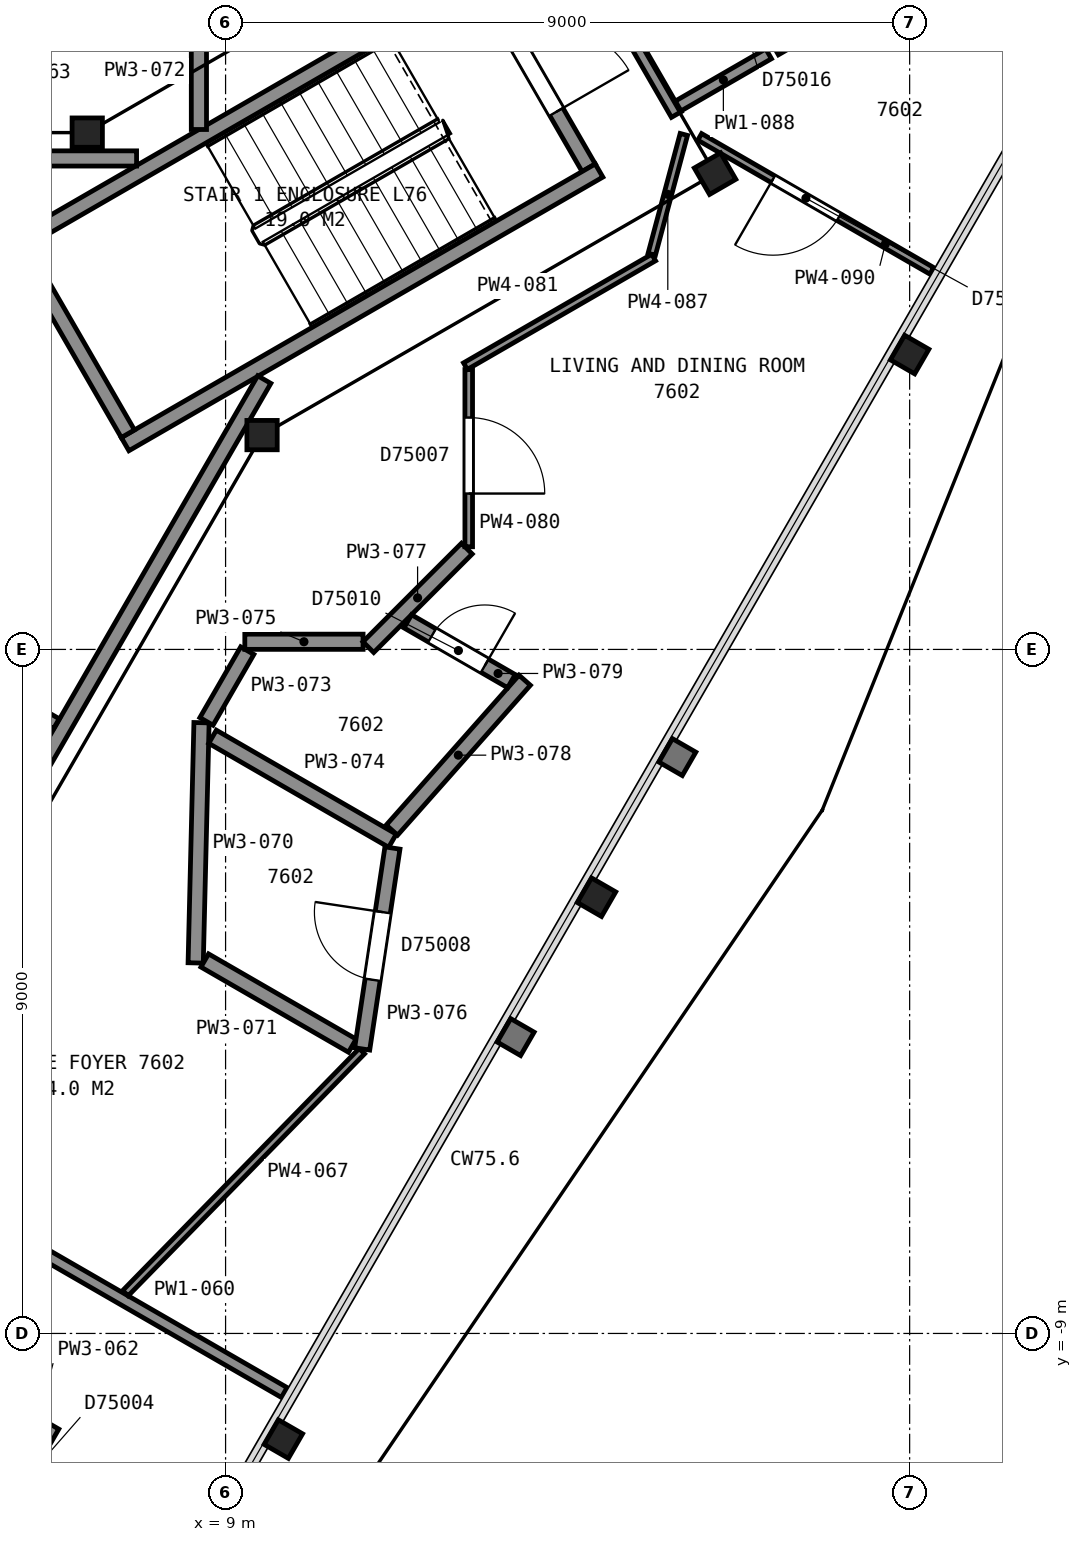
"""IFC4 building model, lengths in metres.
Left out: names, types, materials, properties, quantities, classifications, styles, units other than length and angle.
Written with IfcOpenShell. Run it as: python <this file> out.ifc"""

import sys

from ifc_helpers import new_model, si_unit, direction, frame, frame_2d, origin, origin_2d, place, context, subcontext, project, spatial, rectangle, i_section, extrude, element, fill, save


model = new_model("IFC4")
c1 = context("Model", 3, precision=1e-05, world=origin(), true_north=direction((0.0, 1.0)))
c2 = subcontext(c1, "Body", "Model", "MODEL_VIEW")
j1 = project(units=[si_unit("LENGTHUNIT", "METRE"), si_unit("PLANEANGLEUNIT", "RADIAN")], contexts=[c1])
p1 = place(None, origin())
s1 = spatial("IfcSite", under=j1, at=p1, CompositionType="ELEMENT")
p2 = place(p1, origin())
s2 = spatial("IfcBuilding", under=s1, at=p2, CompositionType="ELEMENT")
p3 = place(p2, frame((0.0, 0.0, 301.0)))
s3 = spatial("IfcBuildingStorey", under=s2, at=p3, CompositionType="ELEMENT", Elevation=301.0)
for number, where, z_axis, x_axis in (
    (1, (9.76, -10.39, 0.0), (0.0, 0.0, 1.0), (-0.5, -0.866, 0.0)),
    (2, (13.88, -3.26, 0.0), (0.0, 0.0, 1.0), (-0.5, -0.866, 0.0)),
):
    element("IfcColumn", number, at=place(p3, frame(where, z_axis=z_axis, x_axis=x_axis)), inside=s3, PredefinedType="COLUMN", context=c2, shape_type="SweptSolid", body=[
        extrude(i_section(OverallWidth=0.373, OverallDepth=0.368, WebThickness=0.015, FlangeThickness=0.024, FilletRadius=0.015, at=origin_2d()), origin(), (0.0, 0.0, 1.0), 3.655),
    ])
p4 = place(p3, frame((18.0, 3.88, 0.0), z_axis=(0.0, 0.0, 1.0), x_axis=(-0.5, -0.866025403784, 0.0)))
e3 = element("IfcColumn", 3, at=p4, inside=s3, PredefinedType="COLUMN", context=c2, shape_type="SweptSolid", body=[
    extrude(i_section(OverallWidth=0.373, OverallDepth=0.368, WebThickness=0.015, FlangeThickness=0.024, FilletRadius=0.015, at=origin_2d()), origin(), (0.0, 0.0, 1.0), 3.645),
])
p5 = place(p3, frame((9.48, 2.82, 0.0), z_axis=(0.0, 0.0, 1.0), x_axis=(1.0, 0.0, 0.0)))
e4 = element("IfcColumn", 4, at=p5, inside=s3, PredefinedType="COLUMN", context=c2, shape_type="SweptSolid", body=[
    extrude(i_section(OverallWidth=0.399, OverallDepth=0.386, WebThickness=0.021, FlangeThickness=0.033, FilletRadius=0.015, at=origin_2d()), origin(), (0.0, 0.0, 1.0), 3.7),
])
p6 = place(p3, frame((15.44, 6.26, 0.0), z_axis=(0.0, 0.0, 1.0), x_axis=(0.5, -0.866025403784, 0.0)))
e5 = element("IfcColumn", 5, at=p6, inside=s3, PredefinedType="COLUMN", context=c2, shape_type="SweptSolid", body=[
    extrude(i_section(OverallWidth=0.401, OverallDepth=0.399, WebThickness=0.025, FlangeThickness=0.04, FilletRadius=0.015, at=origin_2d()), origin(), (0.0, 0.0, 1.0), 3.7),
])
p7 = place(p3, frame((7.18, 6.8, 0.0), z_axis=(0.0, 0.0, 1.0), x_axis=(1.0, 0.0, 0.0)))
e6 = element("IfcColumn", 6, at=p7, inside=s3, PredefinedType="COLUMN", context=c2, shape_type="SweptSolid", body=[
    extrude(i_section(OverallWidth=0.399, OverallDepth=0.386, WebThickness=0.021, FlangeThickness=0.033, FilletRadius=0.015, at=origin_2d()), origin(), (0.0, 0.0, 1.0), 3.7),
])
p8 = place(p3, frame((13.777, 6.338, 0.0), z_axis=(0.0, 0.0, 1.0), x_axis=(-0.500049511043, 0.865996816683, 0.0)))
e7 = element("IfcWall", 7, at=p8, inside=s3, PredefinedType="PARTITIONING", context=c2, shape_type="SweptSolid", body=[
    extrude(rectangle(XDim=2.8, YDim=0.2, at=frame_2d((1.4, 0.0))), origin(), (0.0, 0.0, 1.0), 3.45),
])
p9 = place(p8, frame((0.85, 0.0, 0.0)))
e8 = element("IfcOpeningElement", 8, at=p9, cuts=e7, PredefinedType="OPENING", context=c2, shape_type="SweptSolid", body=[
    extrude(rectangle(XDim=1.1, YDim=2.1, at=frame_2d((0.55, 1.05))), frame((0.0, 0.11, 0.0), z_axis=(0.0, -1.0, 0.0), x_axis=(1.0, 0.0, 0.0)), (0.0, 0.0, 1.0), 0.22),
])
for number, where, z_axis, x_axis in (
    (9, (6.178, 5.299, 0.0), (0.0, 0.0, 1.0), (0.866, 0.5, 0.0)),
    (10, (7.678, 2.701, 0.0), (0.0, 0.0, 1.0), (0.866, 0.5, 0.0)),
):
    element("IfcWall", number, at=place(p3, frame(where, z_axis=z_axis, x_axis=x_axis)), inside=s3, PredefinedType="PARTITIONING", context=c2, shape_type="SweptSolid", body=[
        extrude(rectangle(XDim=7.2, YDim=0.2, at=frame_2d((3.6, 0.0))), origin(), (0.0, 0.0, 1.0), 3.45),
    ])
p10 = place(p3, frame((7.715, 2.838, 0.0), z_axis=(0.0, 0.0, 1.0), x_axis=(-0.500049511043, 0.865996816683, 0.0)))
e11 = element("IfcWall", 11, at=p10, inside=s3, PredefinedType="PARTITIONING", context=c2, shape_type="SweptSolid", body=[
    extrude(rectangle(XDim=2.8, YDim=0.2, at=frame_2d((1.4, 0.0))), origin(), (0.0, 0.0, 1.0), 3.45),
])
p11 = place(p3, frame((7.829, 6.46, 0.0), z_axis=(0.0, 0.0, 1.0), x_axis=(-1.0, 0.0, 0.0)))
e12 = element("IfcWall", 12, at=p11, inside=s3, PredefinedType="PARTITIONING", context=c2, shape_type="SweptSolid", body=[
    extrude(rectangle(XDim=15.658, YDim=0.2, at=frame_2d((7.829, 0.0))), origin(), (0.0, 0.0, 1.0), 3.45),
])
p12 = place(p11, frame((12.168, 0.0, 0.0)))
e13 = element("IfcOpeningElement", 13, at=p12, cuts=e12, PredefinedType="OPENING", context=c2, shape_type="SweptSolid", body=[
    extrude(rectangle(XDim=1.2, YDim=2.1, at=frame_2d((0.6, 1.05))), frame((0.0, 0.11, 0.0), z_axis=(0.0, -1.0, 0.0), x_axis=(1.0, 0.0, 0.0)), (0.0, 0.0, 1.0), 0.22),
])
p13 = place(p3, frame((3.828, -6.29, 0.0), z_axis=(0.0, 0.0, 1.0), x_axis=(0.499979739078, 0.866037101117, 0.0)))
e14 = element("IfcWall", 14, at=p13, inside=s3, PredefinedType="PARTITIONING", context=c2, shape_type="SweptSolid", body=[
    extrude(rectangle(XDim=11.363, YDim=0.2, at=frame_2d((5.681, 0.0))), origin(), (0.0, 0.0, 1.0), 3.45),
])
p14 = place(p13, frame((0.55, 0.0, 0.0)))
e15 = element("IfcOpeningElement", 15, at=p14, cuts=e14, PredefinedType="OPENING", context=c2, shape_type="SweptSolid", body=[
    extrude(rectangle(XDim=1.2, YDim=2.1, at=frame_2d((0.6, 1.05))), frame((0.0, 0.11, 0.0), z_axis=(0.0, -1.0, 0.0), x_axis=(1.0, 0.0, 0.0)), (0.0, 0.0, 1.0), 0.22),
])
p15 = place(p3, frame((6.774, -0.978, 0.0), z_axis=(0.0, 0.0, 1.0), x_axis=(-0.866062920605, 0.499935013329, 0.0)))
e16 = element("IfcWall", 16, at=p15, inside=s3, PredefinedType="PARTITIONING", context=c2, shape_type="SweptSolid", body=[
    extrude(rectangle(XDim=2.22, YDim=0.15, at=frame_2d((1.11, 0.0))), origin(), (0.0, 0.0, 1.0), 3.45),
])
p16 = place(p15, frame((0.646, 0.0, 0.0)))
e17 = element("IfcOpeningElement", 17, at=p16, cuts=e16, PredefinedType="OPENING", context=c2, shape_type="SweptSolid", body=[
    extrude(rectangle(XDim=0.9, YDim=2.1, at=frame_2d((0.45, 1.05))), frame((0.0, 0.085, 0.0), z_axis=(0.0, -1.0, 0.0), x_axis=(1.0, 0.0, 0.0)), (0.0, 0.0, 1.0), 0.17),
])
p17 = place(p3, frame((3.682, -8.571, 0.0), z_axis=(0.0, 0.0, 1.0), x_axis=(0.866075604562, -0.499913039621, 0.0)))
e18 = element("IfcWall", 18, at=p17, inside=s3, PredefinedType="PARTITIONING", context=c2, shape_type="SweptSolid", body=[
    extrude(rectangle(XDim=3.549, YDim=0.2, at=frame_2d((1.774, 0.0))), origin(), (0.0, 0.0, 1.0), 2.723),
])
p18 = place(p3, frame((9.772, -9.777, 0.0), z_axis=(0.0, 0.0, 1.0), x_axis=(-0.866083818164, 0.499898809675, 0.0)))
e19 = element("IfcWall", 19, at=p18, inside=s3, PredefinedType="PARTITIONING", context=c2, shape_type="SweptSolid", body=[
    extrude(rectangle(XDim=6.551, YDim=0.15, at=frame_2d((3.275, 0.0))), origin(), (0.0, 0.0, 1.0), 2.723),
])
p19 = place(p18, frame((4.001, 0.0, 0.0)))
e20 = element("IfcOpeningElement", 20, at=p19, cuts=e19, PredefinedType="OPENING", context=c2, shape_type="SweptSolid", body=[
    extrude(rectangle(XDim=1.0, YDim=2.1, at=frame_2d((0.5, 1.05))), frame((0.0, 0.085, 0.0), z_axis=(0.0, -1.0, 0.0), x_axis=(1.0, 0.0, 0.0)), (0.0, 0.0, 1.0), 0.17),
])
p20 = place(p3, frame((7.682, -8.47, 0.0), z_axis=(0.0, 0.0, 1.0), x_axis=(0.698777378461, 0.715339203002, 0.0)))
e21 = element("IfcWall", 21, at=p20, inside=s3, PredefinedType="PARTITIONING", context=c2, shape_type="SweptSolid", body=[
    extrude(rectangle(XDim=4.452, YDim=0.1, at=frame_2d((2.226, 0.0))), origin(), (0.0, 0.0, 1.0), 2.723),
])
p21 = place(p3, frame((8.607, -4.125, 0.0), z_axis=(0.0, 0.0, 1.0), x_axis=(0.024245593124, 0.999706032399, 0.0)))
e22 = element("IfcWall", 22, at=p21, inside=s3, PredefinedType="PARTITIONING", context=c2, shape_type="SweptSolid", body=[
    extrude(rectangle(XDim=3.162, YDim=0.2, at=frame_2d((1.581, 0.0))), origin(), (0.0, 0.0, 1.0), 2.723),
])
p22 = place(p3, frame((8.726, -4.093, 0.0), z_axis=(0.0, 0.0, 1.0), x_axis=(0.866056839033, -0.499945548598, 0.0)))
e23 = element("IfcWall", 23, at=p22, inside=s3, PredefinedType="PARTITIONING", context=c2, shape_type="SweptSolid", body=[
    extrude(rectangle(XDim=2.242, YDim=0.2, at=frame_2d((1.121, 0.0))), origin(), (0.0, 0.0, 1.0), 2.723),
])
p23 = place(p3, frame((8.649, 6.841, 0.0), z_axis=(0.0, 0.0, 1.0), x_axis=(0.0, 1.0, 0.0)))
e24 = element("IfcWall", 24, at=p23, inside=s3, PredefinedType="PARTITIONING", context=c2, shape_type="SweptSolid", body=[
    extrude(rectangle(XDim=1.528, YDim=0.2, at=frame_2d((0.764, 0.0))), origin(), (0.0, 0.0, 1.0), 2.723),
])
p24 = place(p3, frame((8.749, -0.947, 0.0), z_axis=(0.0, 0.0, 1.0), x_axis=(0.499656913366, 0.866223394354, 0.0)))
e25 = element("IfcWall", 25, at=p24, inside=s3, PredefinedType="PARTITIONING", context=c2, shape_type="SweptSolid", body=[
    extrude(rectangle(XDim=1.075, YDim=0.2, at=frame_2d((0.538, 0.0))), origin(), (0.0, 0.0, 1.0), 2.723),
])
p25 = place(p3, frame((8.828, -1.149, 0.0), z_axis=(0.0, 0.0, 1.0), x_axis=(0.865853899269, -0.50029693695, 0.0)))
e26 = element("IfcWall", 26, at=p25, inside=s3, PredefinedType="PARTITIONING", context=c2, shape_type="SweptSolid", body=[
    extrude(rectangle(XDim=2.734, YDim=0.2, at=frame_2d((1.367, 0.0))), origin(), (0.0, 0.0, 1.0), 2.723),
])
p26 = place(p3, frame((9.253, 0.101, 0.0), z_axis=(0.0, 0.0, 1.0), x_axis=(1.0, 0.0, 0.0)))
e27 = element("IfcWall", 27, at=p26, inside=s3, PredefinedType="PARTITIONING", context=c2, shape_type="SweptSolid", body=[
    extrude(rectangle(XDim=1.556, YDim=0.2, at=frame_2d((0.778, 0.0))), origin(), (0.0, 0.0, 1.0), 2.723),
])
p27 = place(p3, frame((10.797, -5.256, 0.0), z_axis=(0.0, 0.0, 1.0), x_axis=(0.148961207986, 0.988843040384, 0.0)))
e28 = element("IfcWall", 28, at=p27, inside=s3, PredefinedType="PARTITIONING", context=c2, shape_type="SweptSolid", body=[
    extrude(rectangle(XDim=2.673, YDim=0.2, at=frame_2d((1.336, 0.0))), origin(), (0.0, 0.0, 1.0), 2.723),
])
p28 = place(p27, frame((0.92, 0.0, 0.0)))
e29 = element("IfcOpeningElement", 29, at=p28, cuts=e28, PredefinedType="OPENING", context=c2, shape_type="SweptSolid", body=[
    extrude(rectangle(XDim=0.9, YDim=2.1, at=frame_2d((0.45, 1.05))), frame((0.0, 0.11, 0.0), z_axis=(0.0, -1.0, 0.0), x_axis=(1.0, 0.0, 0.0)), (0.0, 0.0, 1.0), 0.22),
])
p29 = place(p3, frame((10.878, 0.03, 0.0), z_axis=(0.0, 0.0, 1.0), x_axis=(0.707173379423, 0.707040176677, 0.0)))
e30 = element("IfcWall", 30, at=p29, inside=s3, PredefinedType="PARTITIONING", context=c2, shape_type="SweptSolid", body=[
    extrude(rectangle(XDim=1.833, YDim=0.2, at=frame_2d((0.917, 0.0))), origin(), (0.0, 0.0, 1.0), 2.723),
])
p30 = place(p3, frame((11.188, -2.377, 0.0), z_axis=(0.0, 0.0, 1.0), x_axis=(0.663045631266, 0.748578981043, 0.0)))
e31 = element("IfcWall", 31, at=p30, inside=s3, PredefinedType="PARTITIONING", context=c2, shape_type="SweptSolid", body=[
    extrude(rectangle(XDim=2.635, YDim=0.2, at=frame_2d((1.317, 0.0))), origin(), (0.0, 0.0, 1.0), 2.723),
])
p31 = place(p3, frame((12.761, -0.417, 0.0), z_axis=(0.0, 0.0, 1.0), x_axis=(-0.866030680601, 0.499990860175, 0.0)))
e32 = element("IfcWall", 32, at=p31, inside=s3, PredefinedType="PARTITIONING", context=c2, shape_type="SweptSolid", body=[
    extrude(rectangle(XDim=1.575, YDim=0.2, at=frame_2d((0.787, 0.0))), origin(), (0.0, 0.0, 1.0), 2.723),
])
p32 = place(p31, frame((0.405, 0.0, 0.0)))
e33 = element("IfcOpeningElement", 33, at=p32, cuts=e32, PredefinedType="OPENING", context=c2, shape_type="SweptSolid", body=[
    extrude(rectangle(XDim=0.8, YDim=2.1, at=frame_2d((0.4, 1.05))), frame((0.0, 0.11, 0.0), z_axis=(0.0, -1.0, 0.0), x_axis=(1.0, 0.0, 0.0)), (0.0, 0.0, 1.0), 0.22),
])
p33 = place(p3, frame((12.199, 3.682, 0.0), z_axis=(0.0, 0.0, 1.0), x_axis=(0.0, -1.0, 0.0)))
e34 = element("IfcWall", 34, at=p33, inside=s3, PredefinedType="PARTITIONING", context=c2, shape_type="SweptSolid", body=[
    extrude(rectangle(XDim=2.331, YDim=0.1, at=frame_2d((1.166, 0.0))), origin(), (0.0, 0.0, 1.0), 2.723),
])
p34 = place(p33, frame((0.631, 0.0, 0.0)))
e35 = element("IfcOpeningElement", 35, at=p34, cuts=e34, PredefinedType="OPENING", context=c2, shape_type="SweptSolid", body=[
    extrude(rectangle(XDim=1.0, YDim=2.1, at=frame_2d((0.5, 1.05))), frame((0.0, 0.06, 0.0), z_axis=(0.0, -1.0, 0.0), x_axis=(1.0, 0.0, 0.0)), (0.0, 0.0, 1.0), 0.12),
])
p35 = place(p3, frame((12.156, 3.727, 0.0), z_axis=(0.0, 0.0, 1.0), x_axis=(0.866012137121, 0.500022977831, 0.0)))
e36 = element("IfcWall", 36, at=p35, inside=s3, PredefinedType="PARTITIONING", context=c2, shape_type="SweptSolid", body=[
    extrude(rectangle(XDim=2.86, YDim=0.1, at=frame_2d((1.43, 0.0))), origin(), (0.0, 0.0, 1.0), 2.723),
])
p36 = place(p3, frame((13.759, 9.069, 0.0), z_axis=(0.0, 0.0, 1.0), x_axis=(0.500046885369, -0.865998332812, 0.0)))
e37 = element("IfcWall", 37, at=p36, inside=s3, PredefinedType="PARTITIONING", context=c2, shape_type="SweptSolid", body=[
    extrude(rectangle(XDim=2.345, YDim=0.15, at=frame_2d((1.172, 0.0))), origin(), (0.0, 0.0, 1.0), 2.723),
])
p37 = place(p3, frame((14.607, 5.2, 0.0), z_axis=(0.0, 0.0, 1.0), x_axis=(0.258519214507, 0.966006115783, 0.0)))
e38 = element("IfcWall", 38, at=p37, inside=s3, PredefinedType="PARTITIONING", context=c2, shape_type="SweptSolid", body=[
    extrude(rectangle(XDim=1.632, YDim=0.1, at=frame_2d((0.816, 0.0))), origin(), (0.0, 0.0, 1.0), 2.723),
])
p38 = place(p3, frame((14.954, 7.149, 0.0), z_axis=(0.0, 0.0, 1.0), x_axis=(0.865960792519, 0.5001118933, 0.0)))
e39 = element("IfcWall", 39, at=p38, inside=s3, PredefinedType="PARTITIONING", context=c2, shape_type="SweptSolid", body=[
    extrude(rectangle(XDim=1.375, YDim=0.15, at=frame_2d((0.688, 0.0))), origin(), (0.0, 0.0, 1.0), 2.723),
])
p39 = place(p3, frame((15.238, 6.744, 0.0), z_axis=(0.0, 0.0, 1.0), x_axis=(0.866104892567, -0.49986229611, 0.0)))
e40 = element("IfcWall", 40, at=p39, inside=s3, PredefinedType="PARTITIONING", context=c2, shape_type="SweptSolid", body=[
    extrude(rectangle(XDim=3.526, YDim=0.1, at=frame_2d((1.763, 0.0))), origin(), (0.0, 0.0, 1.0), 2.723),
])
p40 = place(p39, frame((1.114, 0.0, 0.0)))
e41 = element("IfcOpeningElement", 41, at=p40, cuts=e40, PredefinedType="OPENING", context=c2, shape_type="SweptSolid", body=[
    extrude(rectangle(XDim=1.0, YDim=2.1, at=frame_2d((0.5, 1.05))), frame((0.0, 0.06, 0.0), z_axis=(0.0, -1.0, 0.0), x_axis=(1.0, 0.0, 0.0)), (0.0, 0.0, 1.0), 0.12),
])
p41 = place(p3, frame((16.236, 7.889, 0.0), z_axis=(0.0, 0.0, 1.0), x_axis=(0.865995456094, 0.500051867335, 0.0)))
e42 = element("IfcWall", 42, at=p41, inside=s3, PredefinedType="PARTITIONING", context=c2, shape_type="SweptSolid", body=[
    extrude(rectangle(XDim=6.415, YDim=0.15, at=frame_2d((3.208, 0.0))), origin(), (0.0, 0.0, 1.0), 2.723),
])
p42 = place(p9, origin())
e43 = element("IfcDoor", 43, at=p42, inside=s3, OperationType="SINGLE_SWING_LEFT", PredefinedType="DOOR", context=c2, shape_type="SweptSolid", body=[
    extrude(rectangle(XDim=1.1, YDim=2.1, at=frame_2d((0.55, 1.05))), frame((0.0, 0.025, 0.0), z_axis=(0.0, -1.0, 0.0), x_axis=(1.0, 0.0, 0.0)), (0.0, 0.0, 1.0), 0.05),
])
fill(e8, e43)
p43 = place(p28, origin())
e44 = element("IfcDoor", 44, at=p43, inside=s3, OperationType="SINGLE_SWING_RIGHT", PredefinedType="DOOR", context=c2, shape_type="SweptSolid", body=[
    extrude(rectangle(XDim=0.9, YDim=2.1, at=frame_2d((0.45, 1.05))), frame((0.0, 0.025, 0.0), z_axis=(0.0, -1.0, 0.0), x_axis=(1.0, 0.0, 0.0)), (0.0, 0.0, 1.0), 0.05),
])
fill(e29, e44)
p44 = place(p32, origin())
e45 = element("IfcDoor", 45, at=p44, inside=s3, OperationType="SINGLE_SWING_LEFT", PredefinedType="DOOR", context=c2, shape_type="SweptSolid", body=[
    extrude(rectangle(XDim=0.8, YDim=2.1, at=frame_2d((0.4, 1.05))), frame((0.0, 0.025, 0.0), z_axis=(0.0, -1.0, 0.0), x_axis=(1.0, 0.0, 0.0)), (0.0, 0.0, 1.0), 0.05),
])
fill(e33, e45)
p45 = place(p34, origin())
e46 = element("IfcDoor", 46, at=p45, inside=s3, OperationType="SINGLE_SWING_RIGHT", PredefinedType="DOOR", context=c2, shape_type="SweptSolid", body=[
    extrude(rectangle(XDim=1.0, YDim=2.1, at=frame_2d((0.5, 1.05))), frame((0.0, 0.025, 0.0), z_axis=(0.0, -1.0, 0.0), x_axis=(1.0, 0.0, 0.0)), (0.0, 0.0, 1.0), 0.05),
])
fill(e35, e46)
p46 = place(p40, origin())
e47 = element("IfcDoor", 47, at=p46, inside=s3, OperationType="SINGLE_SWING_LEFT", PredefinedType="DOOR", context=c2, shape_type="SweptSolid", body=[
    extrude(rectangle(XDim=1.0, YDim=2.1, at=frame_2d((0.5, 1.05))), frame((0.0, 0.025, 0.0), z_axis=(0.0, -1.0, 0.0), x_axis=(1.0, 0.0, 0.0)), (0.0, 0.0, 1.0), 0.05),
])
fill(e41, e47)
save(model, sys.argv[1])
